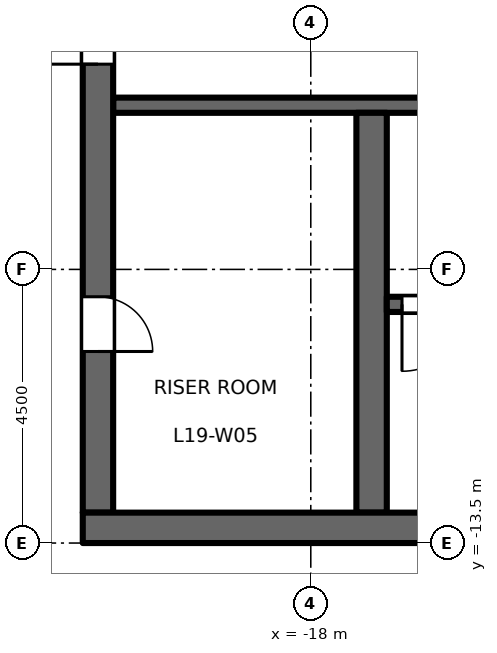
"""IFC4 building model, lengths in metres.
Left out: names, types, materials, properties, quantities, classifications, styles, units other than length and angle.
Written with IfcOpenShell. Run it as: python <this file> out.ifc"""

import sys

from ifc_helpers import new_model, si_unit, direction, frame, frame_2d, origin, place, context, subcontext, project, spatial, rectangle, extrude, element, fill, save


model = new_model("IFC4")
c1 = context("Model", 3, precision=1e-05, world=origin(), true_north=direction((0.0, 1.0)))
c2 = subcontext(c1, "Body", "Model", "MODEL_VIEW")
j1 = project(units=[si_unit("LENGTHUNIT", "METRE"), si_unit("PLANEANGLEUNIT", "RADIAN")], contexts=[c1])
p1 = place(None, origin())
s1 = spatial("IfcSite", under=j1, at=p1, CompositionType="ELEMENT")
p2 = place(p1, origin())
s2 = spatial("IfcBuilding", under=s1, at=p2, CompositionType="ELEMENT")
p3 = place(p2, frame((0.0, 0.0, 89.7)))
s3 = spatial("IfcBuildingStorey", under=s2, at=p3, CompositionType="ELEMENT", Elevation=89.7)
p4 = place(p3, frame((-12.15, -6.3, 0.0), z_axis=(0.0, 0.0, 1.0), x_axis=(-1.0, 0.0, 0.0)))
e1 = element("IfcWall", 1, at=p4, inside=s3, PredefinedType="SHEAR", context=c2, shape_type="SweptSolid", body=[
    extrude(rectangle(XDim=9.1, YDim=0.25, at=frame_2d((4.55, 0.0))), origin(), (0.0, 0.0, 1.0), 4.3),
])
p5 = place(p4, frame((1.8, 0.0, 0.0)))
e2 = element("IfcOpeningElement", 2, at=p5, cuts=e1, PredefinedType="OPENING", context=c2, shape_type="SweptSolid", body=[
    extrude(rectangle(XDim=1.0, YDim=2.1, at=frame_2d((0.5, 1.05))), frame((0.0, 0.135, 0.0), z_axis=(0.0, -1.0, 0.0), x_axis=(1.0, 0.0, 0.0)), (0.0, 0.0, 1.0), 0.27),
])
p6 = place(p3, frame((-21.5, -13.0, 0.0), z_axis=(0.0, 0.0, 1.0), x_axis=(0.0, 1.0, 0.0)))
e3 = element("IfcWall", 3, at=p6, inside=s3, PredefinedType="SHEAR", context=c2, shape_type="SweptSolid", body=[
    extrude(rectangle(XDim=26.0, YDim=0.5, at=frame_2d((13.0, 0.0))), origin(), (0.0, 0.0, 1.0), 4.3),
])
p7 = place(p6, frame((16.825, 0.0, 0.0)))
e4 = element("IfcOpeningElement", 4, at=p7, cuts=e3, PredefinedType="OPENING", context=c2, shape_type="SweptSolid", body=[
    extrude(rectangle(XDim=1.8, YDim=2.1, at=frame_2d((0.9, 1.05))), frame((0.0, 0.26, 0.0), z_axis=(0.0, -1.0, 0.0), x_axis=(1.0, 0.0, 0.0)), (0.0, 0.0, 1.0), 0.52),
])
p8 = place(p6, frame((7.375, 0.0, 0.0)))
e5 = element("IfcOpeningElement", 5, at=p8, cuts=e3, PredefinedType="OPENING", context=c2, shape_type="SweptSolid", body=[
    extrude(rectangle(XDim=1.8, YDim=2.1, at=frame_2d((0.9, 1.05))), frame((0.0, 0.26, 0.0), z_axis=(0.0, -1.0, 0.0), x_axis=(1.0, 0.0, 0.0)), (0.0, 0.0, 1.0), 0.52),
])
p9 = place(p6, frame((2.65, 0.0, 0.0)))
e6 = element("IfcOpeningElement", 6, at=p9, cuts=e3, PredefinedType="OPENING", context=c2, shape_type="SweptSolid", body=[
    extrude(rectangle(XDim=0.9, YDim=2.1, at=frame_2d((0.45, 1.05))), frame((0.0, 0.26, 0.0), z_axis=(0.0, -1.0, 0.0), x_axis=(1.0, 0.0, 0.0)), (0.0, 0.0, 1.0), 0.52),
])
p10 = place(p3, frame((-17.0, -13.0, 0.0), z_axis=(0.0, 0.0, 1.0), x_axis=(0.0, 1.0, 0.0)))
e7 = element("IfcWall", 7, at=p10, inside=s3, PredefinedType="SHEAR", context=c2, shape_type="SweptSolid", body=[
    extrude(rectangle(XDim=6.575, YDim=0.5, at=frame_2d((3.288, 0.0))), origin(), (0.0, 0.0, 1.0), 4.3),
])
p11 = place(p3, frame((-8.75, -9.575, 0.0), z_axis=(0.0, 0.0, 1.0), x_axis=(-1.0, 0.0, 0.0)))
e8 = element("IfcWall", 8, at=p11, inside=s3, PredefinedType="SHEAR", context=c2, shape_type="SweptSolid", body=[
    extrude(rectangle(XDim=8.0, YDim=0.25, at=frame_2d((4.0, 0.0))), origin(), (0.0, 0.0, 1.0), 4.3),
])
p12 = place(p11, frame((6.65, 0.0, 0.0)))
e9 = element("IfcOpeningElement", 9, at=p12, cuts=e8, PredefinedType="OPENING", context=c2, shape_type="SweptSolid", body=[
    extrude(rectangle(XDim=1.1, YDim=2.1, at=frame_2d((0.55, 1.05))), frame((0.0, 0.135, 0.0), z_axis=(0.0, -1.0, 0.0), x_axis=(1.0, 0.0, 0.0)), (0.0, 0.0, 1.0), 0.27),
])
p13 = place(p3, frame((-8.25, -13.25, 0.0), z_axis=(0.0, 0.0, 1.0), x_axis=(-1.0, 0.0, 0.0)))
e10 = element("IfcWall", 10, at=p13, inside=s3, PredefinedType="SHEAR", context=c2, shape_type="SweptSolid", body=[
    extrude(rectangle(XDim=13.5, YDim=0.5, at=frame_2d((6.75, 0.0))), origin(), (0.0, 0.0, 1.0), 4.3),
])
p14 = place(p12, origin())
e11 = element("IfcDoor", 11, at=p14, inside=s3, OperationType="SINGLE_SWING_LEFT", PredefinedType="DOOR", context=c2, shape_type="SweptSolid", body=[
    extrude(rectangle(XDim=1.1, YDim=2.1, at=frame_2d((0.55, 1.05))), frame((0.0, 0.025, 0.0), z_axis=(0.0, -1.0, 0.0), x_axis=(1.0, 0.0, 0.0)), (0.0, 0.0, 1.0), 0.05),
])
fill(e9, e11)
p15 = place(p8, origin())
e12 = element("IfcDoor", 12, at=p15, inside=s3, OperationType="DOUBLE_DOOR_DOUBLE_SWING", PredefinedType="DOOR", context=c2, shape_type="SweptSolid", body=[
    extrude(rectangle(XDim=1.8, YDim=2.1, at=frame_2d((0.9, 1.05))), frame((0.0, 0.025, 0.0), z_axis=(0.0, -1.0, 0.0), x_axis=(1.0, 0.0, 0.0)), (0.0, 0.0, 1.0), 0.05),
])
fill(e5, e12)
p16 = place(p9, origin())
e13 = element("IfcDoor", 13, at=p16, inside=s3, OperationType="SINGLE_SWING_LEFT", PredefinedType="DOOR", context=c2, shape_type="SweptSolid", body=[
    extrude(rectangle(XDim=0.9, YDim=2.1, at=frame_2d((0.45, 1.05))), frame((0.0, 0.025, 0.0), z_axis=(0.0, -1.0, 0.0), x_axis=(1.0, 0.0, 0.0)), (0.0, 0.0, 1.0), 0.05),
])
fill(e6, e13)
save(model, sys.argv[1])
